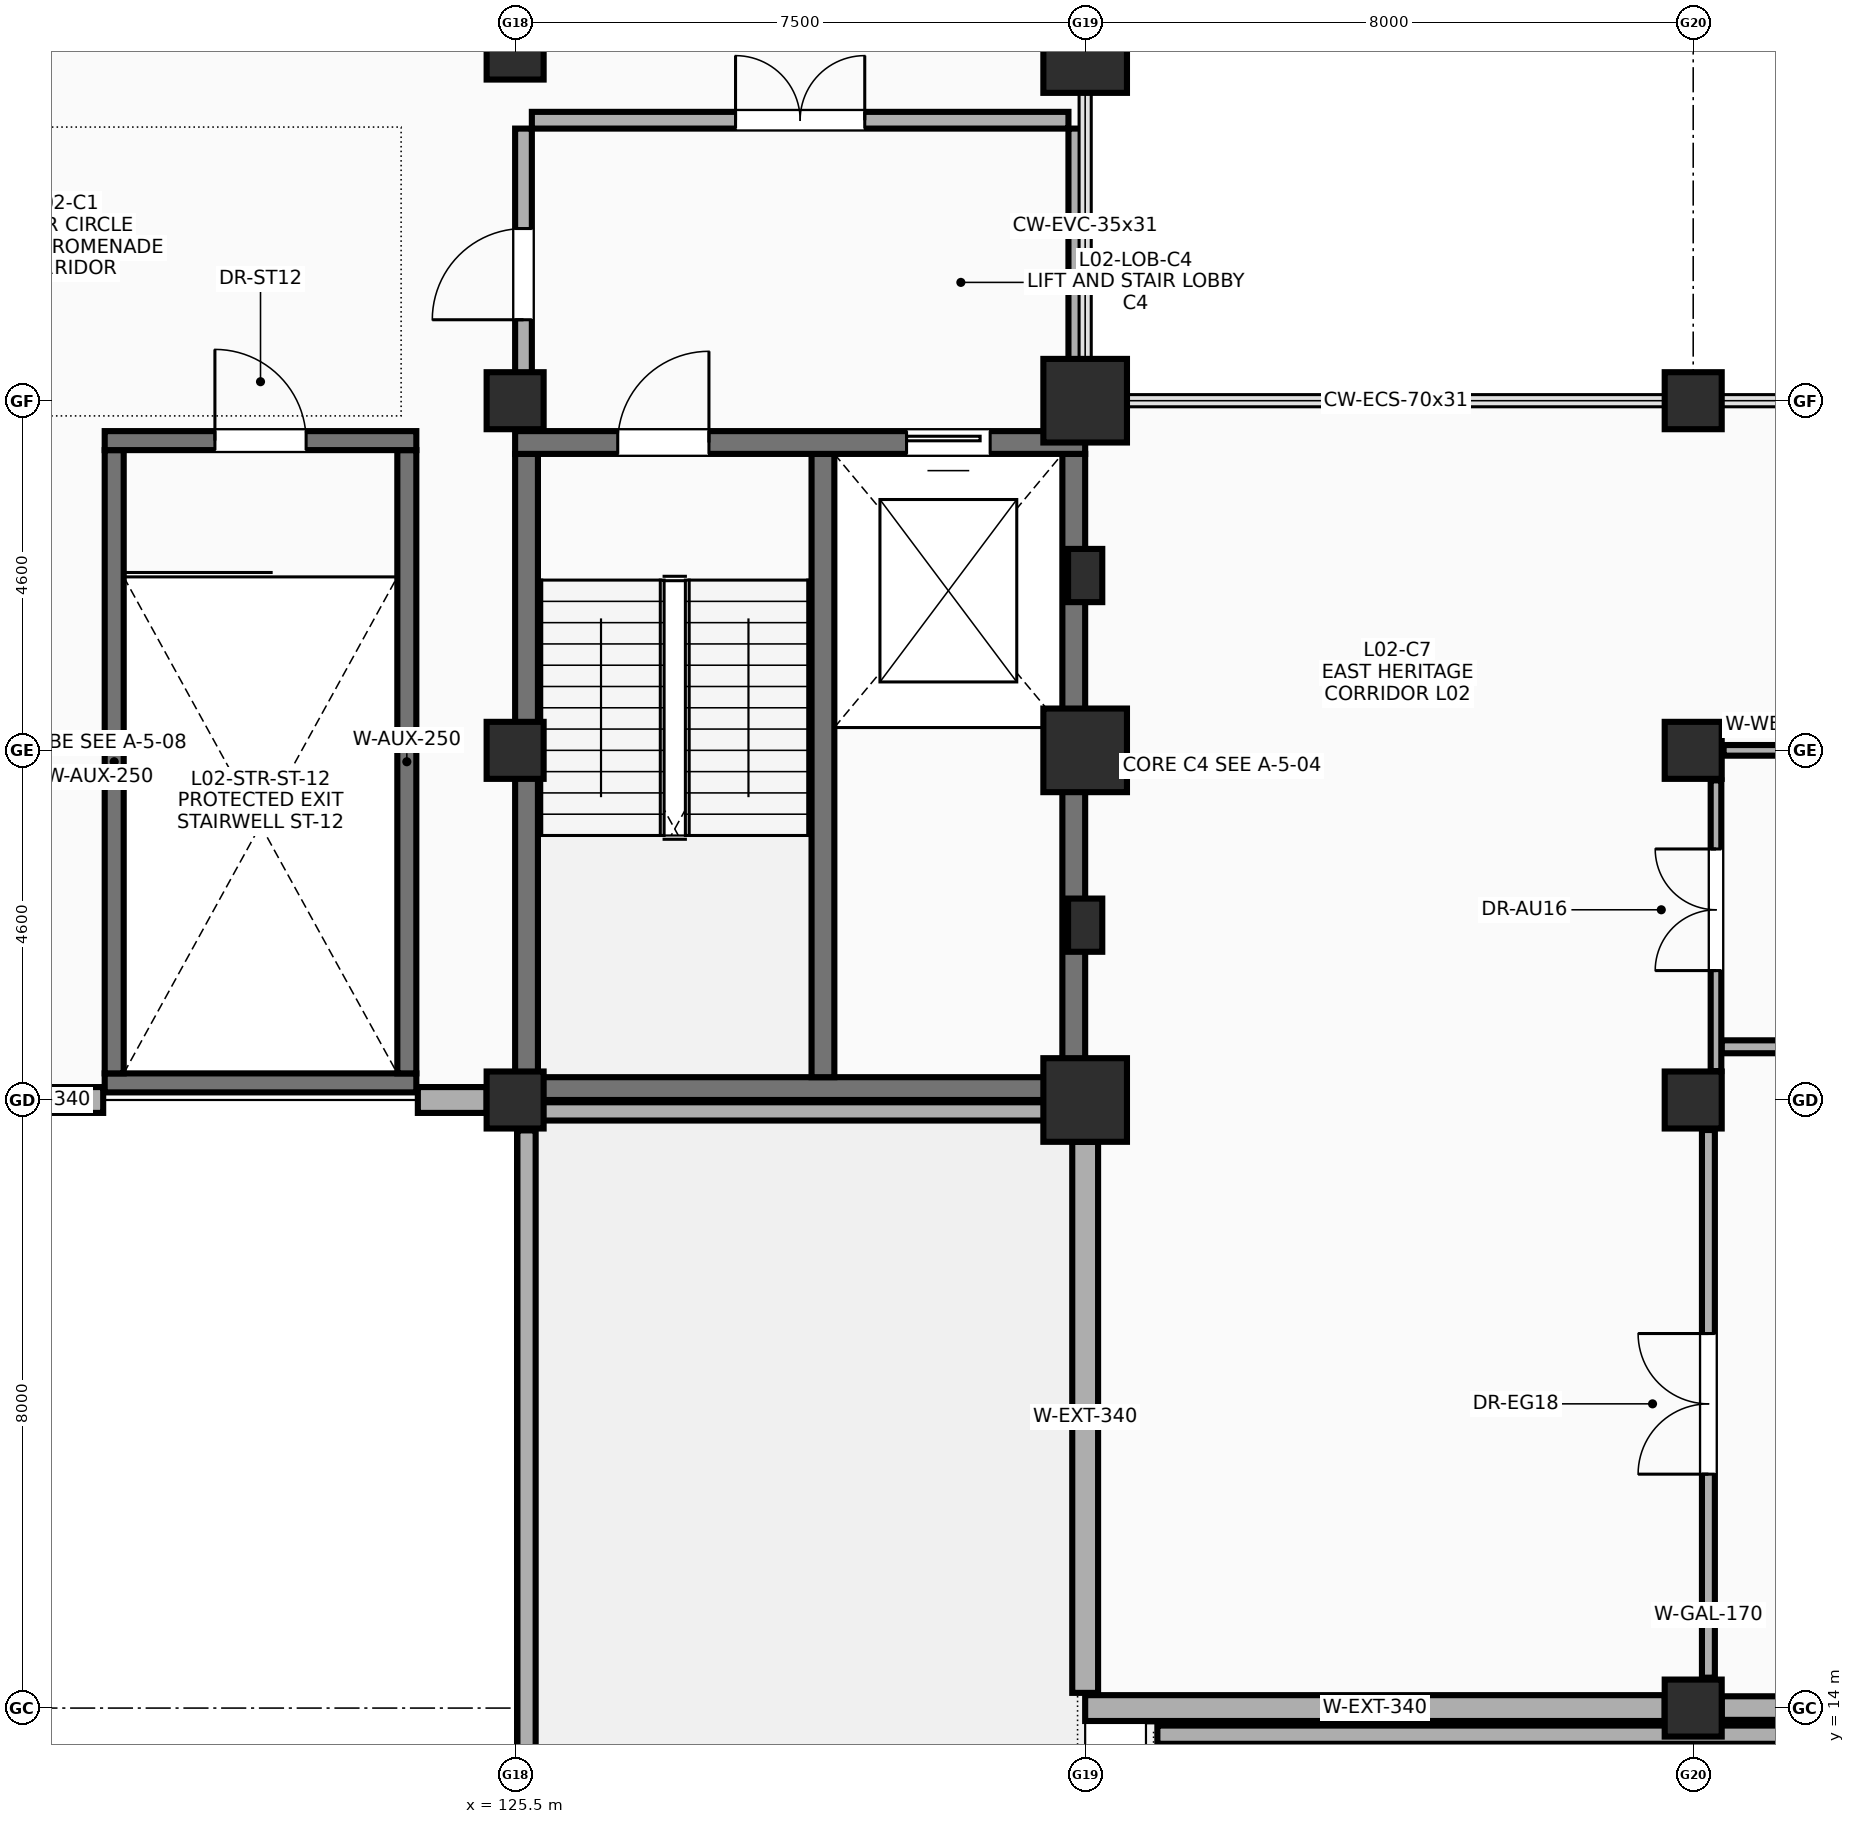
"""IFC4 building model, lengths in metres.
Left out: names, types, materials, properties, quantities, classifications, styles, units other than length and angle.
Written with IfcOpenShell. Run it as: python <this file> out.ifc"""

import sys

from ifc_helpers import new_model, si_unit, direction, frame, frame_2d, origin, origin_2d, place, context, subcontext, project, spatial, rectangle, extrude, element, fill, save


model = new_model("IFC4")
c1 = context("Model", 3, precision=1e-05, world=origin(), true_north=direction((0.0, 1.0)))
c2 = subcontext(c1, "Body", "Model", "MODEL_VIEW")
j1 = project(units=[si_unit("LENGTHUNIT", "METRE"), si_unit("PLANEANGLEUNIT", "RADIAN")], contexts=[c1])
p1 = place(None, origin())
s1 = spatial("IfcSite", under=j1, at=p1, CompositionType="ELEMENT")
p2 = place(p1, origin())
s2 = spatial("IfcBuilding", under=s1, at=p2, CompositionType="ELEMENT")
p3 = place(p2, frame((0.0, 0.0, 9.8)))
s3 = spatial("IfcBuildingStorey", under=s2, at=p3, CompositionType="ELEMENT", Elevation=9.8)
for number, where, z_axis, x_axis in (
    (1, (125.5, 22.0, 0.0), (0.0, 0.0, 1.0), (1.0, 0.0, 0.0)),
    (2, (125.5, 26.6, 0.0), (0.0, 0.0, 1.0), (1.0, 0.0, 0.0)),
    (3, (125.5, 31.2, 0.0), (0.0, 0.0, 1.0), (1.0, 0.0, 0.0)),
    (4, (125.5, 35.8, 0.0), (0.0, 0.0, 1.0), (1.0, 0.0, 0.0)),
):
    element("IfcColumn", number, at=place(p3, frame(where, z_axis=z_axis, x_axis=x_axis)), inside=s3, PredefinedType="COLUMN", context=c2, shape_type="SweptSolid", body=[
        extrude(rectangle(XDim=0.75, YDim=0.75, at=origin_2d()), origin(), (0.0, 0.0, 1.0), 4.4),
    ])
for number, where, z_axis, x_axis in (
    (5, (133.0, 22.0, 0.0), (0.0, 0.0, 1.0), (1.0, 0.0, 0.0)),
    (6, (133.0, 26.6, 0.0), (0.0, 0.0, 1.0), (1.0, 0.0, 0.0)),
    (7, (133.0, 31.2, 0.0), (0.0, 0.0, 1.0), (1.0, 0.0, 0.0)),
    (8, (133.0, 35.8, 0.0), (0.0, 0.0, 1.0), (1.0, 0.0, 0.0)),
):
    element("IfcColumn", number, at=place(p3, frame(where, z_axis=z_axis, x_axis=x_axis)), inside=s3, PredefinedType="COLUMN", context=c2, shape_type="SweptSolid", body=[
        extrude(rectangle(XDim=1.1, YDim=1.1, at=origin_2d()), origin(), (0.0, 0.0, 1.0), 4.4),
    ])
for number, where, z_axis, x_axis in (
    (9, (141.0, 14.0, 0.0), (0.0, 0.0, 1.0), (1.0, 0.0, 0.0)),
    (10, (141.0, 22.0, 0.0), (0.0, 0.0, 1.0), (1.0, 0.0, 0.0)),
    (11, (141.0, 26.6, 0.0), (0.0, 0.0, 1.0), (1.0, 0.0, 0.0)),
    (12, (141.0, 31.2, 0.0), (0.0, 0.0, 1.0), (1.0, 0.0, 0.0)),
):
    element("IfcColumn", number, at=place(p3, frame(where, z_axis=z_axis, x_axis=x_axis)), inside=s3, PredefinedType="COLUMN", context=c2, shape_type="SweptSolid", body=[
        extrude(rectangle(XDim=0.75, YDim=0.75, at=origin_2d()), origin(), (0.0, 0.0, 1.0), 4.4),
    ])
for number, where, z_axis, x_axis in (
    (13, (133.0, 24.3, 0.0), (0.0, 0.0, 1.0), (1.0, 0.0, 0.0)),
    (14, (133.0, 28.9, 0.0), (0.0, 0.0, 1.0), (1.0, 0.0, 0.0)),
):
    element("IfcColumn", number, at=place(p3, frame(where, z_axis=z_axis, x_axis=x_axis)), inside=s3, PredefinedType="PILASTER", context=c2, shape_type="SweptSolid", body=[
        extrude(rectangle(XDim=0.45, YDim=0.7, at=origin_2d()), origin(), (0.0, 0.0, 1.0), 4.4),
    ])
p4 = place(p3, frame((125.5, 22.15, 0.0), z_axis=(0.0, 0.0, 1.0), x_axis=(1.0, 0.0, 0.0)))
e15 = element("IfcWall", 15, at=p4, inside=s3, PredefinedType="SHEAR", context=c2, shape_type="SweptSolid", body=[
    extrude(rectangle(XDim=7.5, YDim=0.3, at=frame_2d((3.75, 0.0))), origin(), (0.0, 0.0, 1.0), 4.4),
])
for number, where, z_axis, x_axis in (
    (16, (125.65, 22.3, 0.0), (0.0, 0.0, 1.0), (0.0, 1.0, 0.0)),
    (17, (132.85, 22.3, 0.0), (0.0, 0.0, 1.0), (0.0, 1.0, 0.0)),
    (18, (129.55, 22.3, 0.0), (0.0, 0.0, 1.0), (0.0, 1.0, 0.0)),
):
    element("IfcWall", number, at=place(p3, frame(where, z_axis=z_axis, x_axis=x_axis)), inside=s3, PredefinedType="SHEAR", context=c2, shape_type="SweptSolid", body=[
        extrude(rectangle(XDim=8.2, YDim=0.3, at=frame_2d((4.1, 0.0))), origin(), (0.0, 0.0, 1.0), 4.4),
    ])
p5 = place(p3, frame((141.375, 14.0, 0.0), z_axis=(0.0, 0.0, 1.0), x_axis=(1.0, 0.0, 0.0)))
e19 = element("IfcWall", 19, at=p5, inside=s3, PredefinedType="SOLIDWALL", context=c2, shape_type="SweptSolid", body=[
    extrude(rectangle(XDim=7.75, YDim=0.31, at=frame_2d((3.875, 0.0))), origin(), (0.0, 0.0, 1.0), 3.15),
])
p6 = place(p5, frame((2.355, 0.0, 1.15)))
e20 = element("IfcOpeningElement", 20, at=p6, cuts=e19, PredefinedType="OPENING", context=c2, shape_type="SweptSolid", body=[
    extrude(rectangle(XDim=3.0, YDim=1.5, at=frame_2d((1.5, 0.75))), frame((0.0, 0.165, 0.0), z_axis=(0.0, -1.0, 0.0), x_axis=(1.0, 0.0, 0.0)), (0.0, 0.0, 1.0), 0.33),
])
p7 = place(p3, frame((133.0, 14.0, 0.0), z_axis=(0.0, 0.0, 1.0), x_axis=(1.0, 0.0, 0.0)))
e21 = element("IfcWall", 21, at=p7, inside=s3, PredefinedType="SOLIDWALL", context=c2, shape_type="SweptSolid", body=[
    extrude(rectangle(XDim=7.625, YDim=0.34, at=frame_2d((3.812, 0.0))), origin(), (0.0, 0.0, 1.0), 3.15),
])
p8 = place(p3, frame((133.0, 14.2, 0.0), z_axis=(0.0, 0.0, 1.0), x_axis=(0.0, 1.0, 0.0)))
e22 = element("IfcWall", 22, at=p8, inside=s3, PredefinedType="SOLIDWALL", context=c2, shape_type="SweptSolid", body=[
    extrude(rectangle(XDim=7.25, YDim=0.34, at=frame_2d((3.625, 0.0))), origin(), (0.0, 0.0, 1.0), 3.15),
])
p9 = place(p3, frame((125.65, 21.85, 0.0), z_axis=(0.0, 0.0, 1.0), x_axis=(1.0, 0.0, 0.0)))
e23 = element("IfcWall", 23, at=p9, inside=s3, PredefinedType="PARAPET", context=c2, shape_type="SweptSolid", body=[
    extrude(rectangle(XDim=7.2, YDim=0.24, at=frame_2d((3.6, 0.0))), origin(), (0.0, 0.0, 1.0), 0.65),
])
p10 = place(p3, frame((125.65, 6.4, 0.0), z_axis=(0.0, 0.0, 1.0), x_axis=(0.0, 1.0, 0.0)))
e24 = element("IfcWall", 24, at=p10, inside=s3, PredefinedType="PARAPET", context=c2, shape_type="SweptSolid", body=[
    extrude(rectangle(XDim=15.2, YDim=0.24, at=frame_2d((7.6, 0.0))), origin(), (0.0, 0.0, 1.0), 0.65),
])
p11 = place(p3, frame((133.95, 13.65, 0.0), z_axis=(0.0, 0.0, 1.0), x_axis=(1.0, 0.0, 0.0)))
e25 = element("IfcWall", 25, at=p11, inside=s3, PredefinedType="PARAPET", context=c2, shape_type="SweptSolid", body=[
    extrude(rectangle(XDim=35.9, YDim=0.24, at=frame_2d((17.95, 0.0))), origin(), (0.0, 0.0, 1.0), 0.65),
])
p12 = place(p3, frame((125.5, 30.65, 0.0), z_axis=(0.0, 0.0, 1.0), x_axis=(1.0, 0.0, 0.0)))
e26 = element("IfcWall", 26, at=p12, inside=s3, PredefinedType="SHEAR", context=c2, shape_type="SweptSolid", body=[
    extrude(rectangle(XDim=7.5, YDim=0.3, at=frame_2d((3.75, 0.0))), origin(), (0.0, 0.0, 1.0), 4.4),
])
p13 = place(p12, frame((1.35, 0.0, 0.0)))
e27 = element("IfcOpeningElement", 27, at=p13, cuts=e26, PredefinedType="OPENING", context=c2, shape_type="SweptSolid", body=[
    extrude(rectangle(XDim=1.2, YDim=2.15, at=frame_2d((0.6, 1.075))), frame((0.0, 0.16, 0.0), z_axis=(0.0, -1.0, 0.0), x_axis=(1.0, 0.0, 0.0)), (0.0, 0.0, 1.0), 0.32),
])
p14 = place(p12, frame((5.15, 0.0, 0.0)))
e28 = element("IfcOpeningElement", 28, at=p14, cuts=e26, PredefinedType="OPENING", context=c2, shape_type="SweptSolid", body=[
    extrude(rectangle(XDim=1.1, YDim=2.15, at=frame_2d((0.55, 1.075))), frame((0.0, 0.16, 0.0), z_axis=(0.0, -1.0, 0.0), x_axis=(1.0, 0.0, 0.0)), (0.0, 0.0, 1.0), 0.32),
])
p15 = place(p3, frame((125.72, 34.89, 0.0), z_axis=(0.0, 0.0, 1.0), x_axis=(1.0, 0.0, 0.0)))
e29 = element("IfcWall", 29, at=p15, inside=s3, PredefinedType="SOLIDWALL", context=c2, shape_type="SweptSolid", body=[
    extrude(rectangle(XDim=7.06, YDim=0.22, at=frame_2d((3.53, 0.0))), origin(), (0.0, 0.0, 1.0), 3.5),
])
p16 = place(p15, frame((2.68, 0.0, 0.0)))
e30 = element("IfcOpeningElement", 30, at=p16, cuts=e29, PredefinedType="OPENING", context=c2, shape_type="SweptSolid", body=[
    extrude(rectangle(XDim=1.7, YDim=2.18, at=frame_2d((0.85, 1.09))), frame((0.0, 0.12, 0.0), z_axis=(0.0, -1.0, 0.0), x_axis=(1.0, 0.0, 0.0)), (0.0, 0.0, 1.0), 0.24),
])
p17 = place(p3, frame((125.61, 30.95, 0.0), z_axis=(0.0, 0.0, 1.0), x_axis=(0.0, 1.0, 0.0)))
e31 = element("IfcWall", 31, at=p17, inside=s3, PredefinedType="SOLIDWALL", context=c2, shape_type="SweptSolid", body=[
    extrude(rectangle(XDim=3.83, YDim=0.22, at=frame_2d((1.915, 0.0))), origin(), (0.0, 0.0, 1.0), 3.3),
])
p18 = place(p17, frame((1.315, 0.0, 0.0)))
e32 = element("IfcOpeningElement", 32, at=p18, cuts=e31, PredefinedType="OPENING", context=c2, shape_type="SweptSolid", body=[
    extrude(rectangle(XDim=1.2, YDim=2.15, at=frame_2d((0.6, 1.075))), frame((0.0, 0.12, 0.0), z_axis=(0.0, -1.0, 0.0), x_axis=(1.0, 0.0, 0.0)), (0.0, 0.0, 1.0), 0.24),
])
p19 = place(p3, frame((132.89, 30.95, 0.0), z_axis=(0.0, 0.0, 1.0), x_axis=(0.0, 1.0, 0.0)))
e33 = element("IfcWall", 33, at=p19, inside=s3, PredefinedType="SOLIDWALL", context=c2, shape_type="SweptSolid", body=[
    extrude(rectangle(XDim=3.83, YDim=0.22, at=frame_2d((1.915, 0.0))), origin(), (0.0, 0.0, 1.0), 3.5),
])
p20 = place(p3, frame((120.1, 22.225, 0.0), z_axis=(0.0, 0.0, 1.0), x_axis=(1.0, 0.0, 0.0)))
e34 = element("IfcWall", 34, at=p20, inside=s3, PredefinedType="SHEAR", context=c2, shape_type="SweptSolid", body=[
    extrude(rectangle(XDim=4.1, YDim=0.25, at=frame_2d((2.05, 0.0))), origin(), (0.0, 0.0, 1.0), 4.4),
])
for number, where, z_axis, x_axis in (
    (35, (120.225, 22.35, 0.0), (0.0, 0.0, 1.0), (0.0, 1.0, 0.0)),
    (36, (124.075, 22.35, 0.0), (0.0, 0.0, 1.0), (0.0, 1.0, 0.0)),
):
    element("IfcWall", number, at=place(p3, frame(where, z_axis=z_axis, x_axis=x_axis)), inside=s3, PredefinedType="SHEAR", context=c2, shape_type="SweptSolid", body=[
        extrude(rectangle(XDim=8.2, YDim=0.25, at=frame_2d((4.1, 0.0))), origin(), (0.0, 0.0, 1.0), 4.4),
    ])
p21 = place(p3, frame((120.1, 30.675, 0.0), z_axis=(0.0, 0.0, 1.0), x_axis=(1.0, 0.0, 0.0)))
e37 = element("IfcWall", 37, at=p21, inside=s3, PredefinedType="SHEAR", context=c2, shape_type="SweptSolid", body=[
    extrude(rectangle(XDim=4.1, YDim=0.25, at=frame_2d((2.05, 0.0))), origin(), (0.0, 0.0, 1.0), 4.4),
])
p22 = place(p21, frame((1.45, 0.0, 0.0)))
e38 = element("IfcOpeningElement", 38, at=p22, cuts=e37, PredefinedType="OPENING", context=c2, shape_type="SweptSolid", body=[
    extrude(rectangle(XDim=1.2, YDim=2.15, at=frame_2d((0.6, 1.075))), frame((0.0, 0.135, 0.0), z_axis=(0.0, -1.0, 0.0), x_axis=(1.0, 0.0, 0.0)), (0.0, 0.0, 1.0), 0.27),
])
p23 = place(p3, frame((141.375, 22.7, 0.0), z_axis=(0.0, 0.0, 1.0), x_axis=(1.0, 0.0, 0.0)))
e39 = element("IfcWall", 39, at=p23, inside=s3, PredefinedType="PARTITIONING", context=c2, shape_type="SweptSolid", body=[
    extrude(rectangle(XDim=7.825, YDim=0.17, at=frame_2d((3.913, 0.0))), origin(), (0.0, 0.0, 1.0), 3.53),
])
p24 = place(p3, frame((141.2, 14.4, 0.0), z_axis=(0.0, 0.0, 1.0), x_axis=(0.0, 1.0, 0.0)))
e40 = element("IfcWall", 40, at=p24, inside=s3, PredefinedType="PARTITIONING", context=c2, shape_type="SweptSolid", body=[
    extrude(rectangle(XDim=7.205, YDim=0.17, at=frame_2d((3.603, 0.0))), origin(), (0.0, 0.0, 1.0), 3.33),
])
p25 = place(p24, frame((2.677, 0.0, 0.0)))
e41 = element("IfcOpeningElement", 41, at=p25, cuts=e40, PredefinedType="OPENING", context=c2, shape_type="SweptSolid", body=[
    extrude(rectangle(XDim=1.85, YDim=2.3, at=frame_2d((0.925, 1.15))), frame((0.0, 0.095, 0.0), z_axis=(0.0, -1.0, 0.0), x_axis=(1.0, 0.0, 0.0)), (0.0, 0.0, 1.0), 0.19),
])
p26 = place(p3, frame((141.3, 22.38, 0.0), z_axis=(0.0, 0.0, 1.0), x_axis=(0.0, 1.0, 0.0)))
e42 = element("IfcWall", 42, at=p26, inside=s3, PredefinedType="PARTITIONING", context=c2, shape_type="SweptSolid", body=[
    extrude(rectangle(XDim=3.825, YDim=0.14, at=frame_2d((1.913, 0.0))), origin(), (0.0, 0.0, 1.0), 3.53),
])
p27 = place(p26, frame((1.323, 0.0, 0.0)))
e43 = element("IfcOpeningElement", 43, at=p27, cuts=e42, PredefinedType="OPENING", context=c2, shape_type="SweptSolid", body=[
    extrude(rectangle(XDim=1.6, YDim=2.25, at=frame_2d((0.8, 1.125))), frame((0.0, 0.08, 0.0), z_axis=(0.0, -1.0, 0.0), x_axis=(1.0, 0.0, 0.0)), (0.0, 0.0, 1.0), 0.16),
])
p28 = place(p3, frame((141.4, 26.6, 0.0), z_axis=(0.0, 0.0, 1.0), x_axis=(1.0, 0.0, 0.0)))
e44 = element("IfcWall", 44, at=p28, inside=s3, PredefinedType="PARTITIONING", context=c2, shape_type="SweptSolid", body=[
    extrude(rectangle(XDim=7.705, YDim=0.14, at=frame_2d((3.853, 0.0))), origin(), (0.0, 0.0, 1.0), 3.33),
])
p29 = place(p28, frame((3.052, 0.0, 0.0)))
e45 = element("IfcOpeningElement", 45, at=p29, cuts=e44, PredefinedType="OPENING", context=c2, shape_type="SweptSolid", body=[
    extrude(rectangle(XDim=1.6, YDim=2.25, at=frame_2d((0.8, 1.125))), frame((0.0, 0.08, 0.0), z_axis=(0.0, -1.0, 0.0), x_axis=(1.0, 0.0, 0.0)), (0.0, 0.0, 1.0), 0.16),
])
p30 = place(p3, frame((118.375, 22.0, 0.0), z_axis=(0.0, 0.0, 1.0), x_axis=(1.0, 0.0, 0.0)))
e46 = element("IfcWall", 46, at=p30, inside=s3, PredefinedType="SOLIDWALL", context=c2, shape_type="SweptSolid", body=[
    extrude(rectangle(XDim=1.705, YDim=0.34, at=frame_2d((0.853, 0.0))), origin(), (0.0, 0.0, 1.0), 3.15),
])
p31 = place(p3, frame((124.22, 22.0, 0.0), z_axis=(0.0, 0.0, 1.0), x_axis=(1.0, 0.0, 0.0)))
e47 = element("IfcWall", 47, at=p31, inside=s3, PredefinedType="SOLIDWALL", context=c2, shape_type="SweptSolid", body=[
    extrude(rectangle(XDim=0.905, YDim=0.34, at=frame_2d((0.453, 0.0))), origin(), (0.0, 0.0, 1.0), 3.15),
])
p32 = place(p13, origin())
e48 = element("IfcDoor", 48, at=p32, inside=s3, OperationType="SINGLE_SWING_RIGHT", PredefinedType="DOOR", context=c2, shape_type="SweptSolid", body=[
    extrude(rectangle(XDim=1.2, YDim=2.15, at=frame_2d((0.6, 1.075))), frame((0.0, 0.025, 0.0), z_axis=(0.0, -1.0, 0.0), x_axis=(1.0, 0.0, 0.0)), (0.0, 0.0, 1.0), 0.05),
])
fill(e27, e48)
p33 = place(p14, origin())
e49 = element("IfcDoor", 49, at=p33, inside=s3, OperationType="SLIDING_TO_LEFT", PredefinedType="DOOR", context=c2, shape_type="SweptSolid", body=[
    extrude(rectangle(XDim=1.1, YDim=2.15, at=frame_2d((0.55, 1.075))), frame((0.0, 0.025, 0.0), z_axis=(0.0, -1.0, 0.0), x_axis=(1.0, 0.0, 0.0)), (0.0, 0.0, 1.0), 0.05),
])
fill(e28, e49)
p34 = place(p16, origin())
e50 = element("IfcDoor", 50, at=p34, inside=s3, OperationType="DOUBLE_DOOR_SINGLE_SWING", PredefinedType="DOOR", context=c2, shape_type="SweptSolid", body=[
    extrude(rectangle(XDim=1.7, YDim=2.18, at=frame_2d((0.85, 1.09))), frame((0.0, 0.025, 0.0), z_axis=(0.0, -1.0, 0.0), x_axis=(1.0, 0.0, 0.0)), (0.0, 0.0, 1.0), 0.05),
])
fill(e30, e50)
p35 = place(p18, origin())
e51 = element("IfcDoor", 51, at=p35, inside=s3, OperationType="SINGLE_SWING_LEFT", PredefinedType="DOOR", context=c2, shape_type="SweptSolid", body=[
    extrude(rectangle(XDim=1.2, YDim=2.15, at=frame_2d((0.6, 1.075))), frame((0.0, 0.025, 0.0), z_axis=(0.0, -1.0, 0.0), x_axis=(1.0, 0.0, 0.0)), (0.0, 0.0, 1.0), 0.05),
])
fill(e32, e51)
p36 = place(p22, origin())
e52 = element("IfcDoor", 52, at=p36, inside=s3, OperationType="SINGLE_SWING_LEFT", PredefinedType="DOOR", context=c2, shape_type="SweptSolid", body=[
    extrude(rectangle(XDim=1.2, YDim=2.15, at=frame_2d((0.6, 1.075))), frame((0.0, 0.025, 0.0), z_axis=(0.0, -1.0, 0.0), x_axis=(1.0, 0.0, 0.0)), (0.0, 0.0, 1.0), 0.05),
])
fill(e38, e52)
p37 = place(p25, origin())
e53 = element("IfcDoor", 53, at=p37, inside=s3, OperationType="DOUBLE_DOOR_SINGLE_SWING", PredefinedType="DOOR", context=c2, shape_type="SweptSolid", body=[
    extrude(rectangle(XDim=1.85, YDim=2.3, at=frame_2d((0.925, 1.15))), frame((0.0, 0.025, 0.0), z_axis=(0.0, -1.0, 0.0), x_axis=(1.0, 0.0, 0.0)), (0.0, 0.0, 1.0), 0.05),
])
fill(e41, e53)
p38 = place(p27, origin())
e54 = element("IfcDoor", 54, at=p38, inside=s3, OperationType="DOUBLE_DOOR_SINGLE_SWING", PredefinedType="DOOR", context=c2, shape_type="SweptSolid", body=[
    extrude(rectangle(XDim=1.6, YDim=2.25, at=frame_2d((0.8, 1.125))), frame((0.0, 0.025, 0.0), z_axis=(0.0, -1.0, 0.0), x_axis=(1.0, 0.0, 0.0)), (0.0, 0.0, 1.0), 0.05),
])
fill(e43, e54)
save(model, sys.argv[1])
